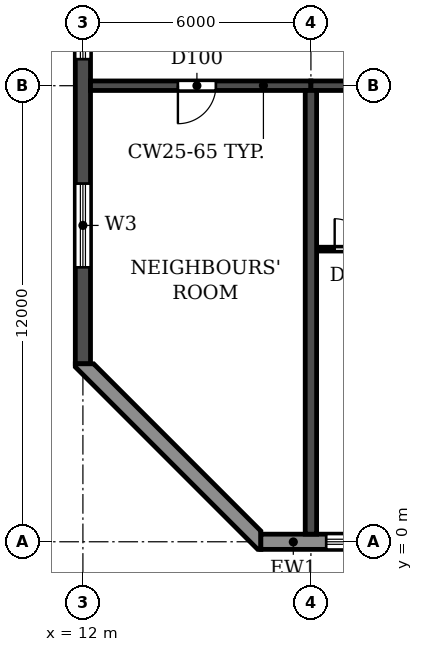
"""IFC4 building model, lengths in metres.
Left out: names, types, materials, properties, quantities, classifications, styles, units other than length and angle.
Written with IfcOpenShell. Run it as: python <this file> out.ifc"""

import sys

from ifc_helpers import new_model, si_unit, direction, frame, frame_2d, origin, place, context, subcontext, project, spatial, polyline, rectangle, outline, extrude, element, fill, save


model = new_model("IFC4")
c1 = context("Model", 3, precision=1e-05, world=origin(), true_north=direction((0.0, 1.0)))
c2 = subcontext(c1, "Body", "Model", "MODEL_VIEW")
j1 = project(units=[si_unit("LENGTHUNIT", "METRE"), si_unit("PLANEANGLEUNIT", "RADIAN")], contexts=[c1])
p1 = place(None, origin())
s1 = spatial("IfcSite", under=j1, at=p1, CompositionType="ELEMENT")
p2 = place(p1, origin())
s2 = spatial("IfcBuilding", under=s1, at=p2, CompositionType="ELEMENT")
p3 = place(p2, frame((0.0, 0.0, 125.7)))
s3 = spatial("IfcBuildingStorey", under=s2, at=p3, CompositionType="ELEMENT", Elevation=125.7)
p4 = place(p3, frame((18.0, 0.2, 0.0), z_axis=(0.0, 0.0, 1.0), x_axis=(0.0, 1.0, 0.0)))
e1 = element("IfcWall", 1, at=p4, inside=s3, PredefinedType="SHEAR", context=c2, shape_type="SweptSolid", body=[
    extrude(rectangle(XDim=11.675, YDim=0.3, at=frame_2d((5.837, 0.0))), origin(), (0.0, 0.0, 1.0), 3.07),
])
p5 = place(p3, frame((12.0, 4.683, 0.0), z_axis=(0.0, 0.0, 1.0), x_axis=(0.0, 1.0, 0.0)))
e2 = element("IfcWall", 2, at=p5, inside=s3, PredefinedType="SHEAR", context=c2, shape_type="SweptSolid", body=[
    extrude(rectangle(XDim=33.034, YDim=0.4, at=frame_2d((16.517, 0.0))), origin(), (0.0, 0.0, 1.0), 3.07),
])
p6 = place(p5, frame((23.817, 0.0, 0.9)))
e3 = element("IfcOpeningElement", 3, at=p6, cuts=e2, PredefinedType="OPENING", context=c2, shape_type="SweptSolid", body=[
    extrude(rectangle(XDim=1.2, YDim=1.5, at=frame_2d((0.6, 0.75))), frame((0.0, 0.21, 0.0), z_axis=(0.0, -1.0, 0.0), x_axis=(1.0, 0.0, 0.0)), (0.0, 0.0, 1.0), 0.42),
])
p7 = place(p5, frame((8.017, 0.0, 0.9)))
e4 = element("IfcOpeningElement", 4, at=p7, cuts=e2, PredefinedType="OPENING", context=c2, shape_type="SweptSolid", body=[
    extrude(rectangle(XDim=1.2, YDim=1.5, at=frame_2d((0.6, 0.75))), frame((0.0, 0.21, 0.0), z_axis=(0.0, -1.0, 0.0), x_axis=(1.0, 0.0, 0.0)), (0.0, 0.0, 1.0), 0.42),
])
p8 = place(p5, frame((28.293, 0.0, 0.6)))
e5 = element("IfcOpeningElement", 5, at=p8, cuts=e2, PredefinedType="OPENING", context=c2, shape_type="SweptSolid", body=[
    extrude(rectangle(XDim=2.2, YDim=1.8, at=frame_2d((1.1, 0.9))), frame((0.0, 0.21, 0.0), z_axis=(0.0, -1.0, 0.0), x_axis=(1.0, 0.0, 0.0)), (0.0, 0.0, 1.0), 0.42),
])
p9 = place(p5, frame((2.541, 0.0, 0.6)))
e6 = element("IfcOpeningElement", 6, at=p9, cuts=e2, PredefinedType="OPENING", context=c2, shape_type="SweptSolid", body=[
    extrude(rectangle(XDim=2.2, YDim=1.8, at=frame_2d((1.1, 0.9))), frame((0.0, 0.21, 0.0), z_axis=(0.0, -1.0, 0.0), x_axis=(1.0, 0.0, 0.0)), (0.0, 0.0, 1.0), 0.42),
])
p10 = place(p5, frame((12.817, 0.0, 0.6)))
e7 = element("IfcOpeningElement", 7, at=p10, cuts=e2, PredefinedType="OPENING", context=c2, shape_type="SweptSolid", body=[
    extrude(rectangle(XDim=2.2, YDim=1.8, at=frame_2d((1.1, 0.9))), frame((0.0, 0.21, 0.0), z_axis=(0.0, -1.0, 0.0), x_axis=(1.0, 0.0, 0.0)), (0.0, 0.0, 1.0), 0.42),
])
p11 = place(p3, frame((12.2, 12.0, 0.0), z_axis=(0.0, 0.0, 1.0), x_axis=(1.0, 0.0, 0.0)))
e8 = element("IfcWall", 8, at=p11, inside=s3, PredefinedType="SHEAR", context=c2, shape_type="SweptSolid", body=[
    extrude(rectangle(XDim=5.8, YDim=0.25, at=frame_2d((2.9, 0.0))), origin(), (0.0, 0.0, 1.0), 2.47),
])
p12 = place(p11, frame((2.3, 0.0, 0.0)))
e9 = element("IfcOpeningElement", 9, at=p12, cuts=e8, PredefinedType="OPENING", context=c2, shape_type="SweptSolid", body=[
    extrude(rectangle(XDim=1.0, YDim=2.1, at=frame_2d((0.5, 1.05))), frame((0.0, 0.135, 0.0), z_axis=(0.0, -1.0, 0.0), x_axis=(1.0, 0.0, 0.0)), (0.0, 0.0, 1.0), 0.27),
])
p13 = place(p3, frame((18.0, 12.0, 0.0), z_axis=(0.0, 0.0, 1.0), x_axis=(1.0, 0.0, 0.0)))
e10 = element("IfcWall", 10, at=p13, inside=s3, PredefinedType="SHEAR", context=c2, shape_type="SweptSolid", body=[
    extrude(rectangle(XDim=6.0, YDim=0.25, at=frame_2d((3.0, 0.0))), origin(), (0.0, 0.0, 1.0), 2.47),
])
p14 = place(p13, frame((2.45, 0.0, 0.0)))
e11 = element("IfcOpeningElement", 11, at=p14, cuts=e10, PredefinedType="OPENING", context=c2, shape_type="SweptSolid", body=[
    extrude(rectangle(XDim=1.0, YDim=2.1, at=frame_2d((0.5, 1.05))), frame((0.0, 0.135, 0.0), z_axis=(0.0, -1.0, 0.0), x_axis=(1.0, 0.0, 0.0)), (0.0, 0.0, 1.0), 0.27),
])
p15 = place(p3, frame((16.683, 0.0, 0.0), z_axis=(0.0, 0.0, 1.0), x_axis=(1.0, 0.0, 0.0)))
e12 = element("IfcWall", 12, at=p15, inside=s3, PredefinedType="STANDARD", context=c2, shape_type="SweptSolid", body=[
    extrude(rectangle(XDim=68.634, YDim=0.4, at=frame_2d((34.317, 0.0))), origin(), (0.0, 0.0, 1.0), 3.07),
])
p16 = place(p15, frame((1.717, 0.0, 0.9)))
e13 = element("IfcOpeningElement", 13, at=p16, cuts=e12, PredefinedType="OPENING", context=c2, shape_type="SweptSolid", body=[
    extrude(rectangle(XDim=2.2, YDim=1.5, at=frame_2d((1.1, 0.75))), frame((0.0, 0.21, 0.0), z_axis=(0.0, -1.0, 0.0), x_axis=(1.0, 0.0, 0.0)), (0.0, 0.0, 1.0), 0.42),
])
p17 = place(p15, frame((4.717, 0.0, 0.9)))
e14 = element("IfcOpeningElement", 14, at=p17, cuts=e12, PredefinedType="OPENING", context=c2, shape_type="SweptSolid", body=[
    extrude(rectangle(XDim=2.2, YDim=1.5, at=frame_2d((1.1, 0.75))), frame((0.0, 0.21, 0.0), z_axis=(0.0, -1.0, 0.0), x_axis=(1.0, 0.0, 0.0)), (0.0, 0.0, 1.0), 0.42),
])
p18 = place(p15, frame((7.717, 0.0, 0.9)))
e15 = element("IfcOpeningElement", 15, at=p18, cuts=e12, PredefinedType="OPENING", context=c2, shape_type="SweptSolid", body=[
    extrude(rectangle(XDim=2.2, YDim=1.5, at=frame_2d((1.1, 0.75))), frame((0.0, 0.21, 0.0), z_axis=(0.0, -1.0, 0.0), x_axis=(1.0, 0.0, 0.0)), (0.0, 0.0, 1.0), 0.42),
])
p19 = place(p15, frame((10.717, 0.0, 0.9)))
e16 = element("IfcOpeningElement", 16, at=p19, cuts=e12, PredefinedType="OPENING", context=c2, shape_type="SweptSolid", body=[
    extrude(rectangle(XDim=2.2, YDim=1.5, at=frame_2d((1.1, 0.75))), frame((0.0, 0.21, 0.0), z_axis=(0.0, -1.0, 0.0), x_axis=(1.0, 0.0, 0.0)), (0.0, 0.0, 1.0), 0.42),
])
p20 = place(p15, frame((13.717, 0.0, 0.9)))
e17 = element("IfcOpeningElement", 17, at=p20, cuts=e12, PredefinedType="OPENING", context=c2, shape_type="SweptSolid", body=[
    extrude(rectangle(XDim=2.2, YDim=1.5, at=frame_2d((1.1, 0.75))), frame((0.0, 0.21, 0.0), z_axis=(0.0, -1.0, 0.0), x_axis=(1.0, 0.0, 0.0)), (0.0, 0.0, 1.0), 0.42),
])
p21 = place(p15, frame((16.717, 0.0, 0.9)))
e18 = element("IfcOpeningElement", 18, at=p21, cuts=e12, PredefinedType="OPENING", context=c2, shape_type="SweptSolid", body=[
    extrude(rectangle(XDim=2.2, YDim=1.5, at=frame_2d((1.1, 0.75))), frame((0.0, 0.21, 0.0), z_axis=(0.0, -1.0, 0.0), x_axis=(1.0, 0.0, 0.0)), (0.0, 0.0, 1.0), 0.42),
])
p22 = place(p15, frame((19.717, 0.0, 0.9)))
e19 = element("IfcOpeningElement", 19, at=p22, cuts=e12, PredefinedType="OPENING", context=c2, shape_type="SweptSolid", body=[
    extrude(rectangle(XDim=2.2, YDim=1.5, at=frame_2d((1.1, 0.75))), frame((0.0, 0.21, 0.0), z_axis=(0.0, -1.0, 0.0), x_axis=(1.0, 0.0, 0.0)), (0.0, 0.0, 1.0), 0.42),
])
p23 = place(p15, frame((22.917, 0.0, 0.0)))
e20 = element("IfcOpeningElement", 20, at=p23, cuts=e12, PredefinedType="OPENING", context=c2, shape_type="SweptSolid", body=[
    extrude(rectangle(XDim=1.8, YDim=2.4, at=frame_2d((0.9, 1.2))), frame((0.0, 0.21, 0.0), z_axis=(0.0, -1.0, 0.0), x_axis=(1.0, 0.0, 0.0)), (0.0, 0.0, 1.0), 0.42),
])
p24 = place(p15, frame((25.717, 0.0, 0.9)))
e21 = element("IfcOpeningElement", 21, at=p24, cuts=e12, PredefinedType="OPENING", context=c2, shape_type="SweptSolid", body=[
    extrude(rectangle(XDim=2.2, YDim=1.5, at=frame_2d((1.1, 0.75))), frame((0.0, 0.21, 0.0), z_axis=(0.0, -1.0, 0.0), x_axis=(1.0, 0.0, 0.0)), (0.0, 0.0, 1.0), 0.42),
])
p25 = place(p15, frame((28.717, 0.0, 0.9)))
e22 = element("IfcOpeningElement", 22, at=p25, cuts=e12, PredefinedType="OPENING", context=c2, shape_type="SweptSolid", body=[
    extrude(rectangle(XDim=2.2, YDim=1.5, at=frame_2d((1.1, 0.75))), frame((0.0, 0.21, 0.0), z_axis=(0.0, -1.0, 0.0), x_axis=(1.0, 0.0, 0.0)), (0.0, 0.0, 1.0), 0.42),
])
p26 = place(p15, frame((31.717, 0.0, 0.9)))
e23 = element("IfcOpeningElement", 23, at=p26, cuts=e12, PredefinedType="OPENING", context=c2, shape_type="SweptSolid", body=[
    extrude(rectangle(XDim=2.2, YDim=1.5, at=frame_2d((1.1, 0.75))), frame((0.0, 0.21, 0.0), z_axis=(0.0, -1.0, 0.0), x_axis=(1.0, 0.0, 0.0)), (0.0, 0.0, 1.0), 0.42),
])
p27 = place(p15, frame((34.917, 0.0, 0.0)))
e24 = element("IfcOpeningElement", 24, at=p27, cuts=e12, PredefinedType="OPENING", context=c2, shape_type="SweptSolid", body=[
    extrude(rectangle(XDim=1.8, YDim=2.4, at=frame_2d((0.9, 1.2))), frame((0.0, 0.21, 0.0), z_axis=(0.0, -1.0, 0.0), x_axis=(1.0, 0.0, 0.0)), (0.0, 0.0, 1.0), 0.42),
])
p28 = place(p15, frame((37.717, 0.0, 0.9)))
e25 = element("IfcOpeningElement", 25, at=p28, cuts=e12, PredefinedType="OPENING", context=c2, shape_type="SweptSolid", body=[
    extrude(rectangle(XDim=2.2, YDim=1.5, at=frame_2d((1.1, 0.75))), frame((0.0, 0.21, 0.0), z_axis=(0.0, -1.0, 0.0), x_axis=(1.0, 0.0, 0.0)), (0.0, 0.0, 1.0), 0.42),
])
p29 = place(p15, frame((40.717, 0.0, 0.9)))
e26 = element("IfcOpeningElement", 26, at=p29, cuts=e12, PredefinedType="OPENING", context=c2, shape_type="SweptSolid", body=[
    extrude(rectangle(XDim=2.2, YDim=1.5, at=frame_2d((1.1, 0.75))), frame((0.0, 0.21, 0.0), z_axis=(0.0, -1.0, 0.0), x_axis=(1.0, 0.0, 0.0)), (0.0, 0.0, 1.0), 0.42),
])
p30 = place(p15, frame((43.717, 0.0, 0.9)))
e27 = element("IfcOpeningElement", 27, at=p30, cuts=e12, PredefinedType="OPENING", context=c2, shape_type="SweptSolid", body=[
    extrude(rectangle(XDim=2.2, YDim=1.5, at=frame_2d((1.1, 0.75))), frame((0.0, 0.21, 0.0), z_axis=(0.0, -1.0, 0.0), x_axis=(1.0, 0.0, 0.0)), (0.0, 0.0, 1.0), 0.42),
])
p31 = place(p15, frame((46.917, 0.0, 0.0)))
e28 = element("IfcOpeningElement", 28, at=p31, cuts=e12, PredefinedType="OPENING", context=c2, shape_type="SweptSolid", body=[
    extrude(rectangle(XDim=1.8, YDim=2.4, at=frame_2d((0.9, 1.2))), frame((0.0, 0.21, 0.0), z_axis=(0.0, -1.0, 0.0), x_axis=(1.0, 0.0, 0.0)), (0.0, 0.0, 1.0), 0.42),
])
p32 = place(p15, frame((49.717, 0.0, 0.9)))
e29 = element("IfcOpeningElement", 29, at=p32, cuts=e12, PredefinedType="OPENING", context=c2, shape_type="SweptSolid", body=[
    extrude(rectangle(XDim=2.2, YDim=1.5, at=frame_2d((1.1, 0.75))), frame((0.0, 0.21, 0.0), z_axis=(0.0, -1.0, 0.0), x_axis=(1.0, 0.0, 0.0)), (0.0, 0.0, 1.0), 0.42),
])
p33 = place(p15, frame((52.717, 0.0, 0.9)))
e30 = element("IfcOpeningElement", 30, at=p33, cuts=e12, PredefinedType="OPENING", context=c2, shape_type="SweptSolid", body=[
    extrude(rectangle(XDim=2.2, YDim=1.5, at=frame_2d((1.1, 0.75))), frame((0.0, 0.21, 0.0), z_axis=(0.0, -1.0, 0.0), x_axis=(1.0, 0.0, 0.0)), (0.0, 0.0, 1.0), 0.42),
])
p34 = place(p15, frame((55.717, 0.0, 0.9)))
e31 = element("IfcOpeningElement", 31, at=p34, cuts=e12, PredefinedType="OPENING", context=c2, shape_type="SweptSolid", body=[
    extrude(rectangle(XDim=2.2, YDim=1.5, at=frame_2d((1.1, 0.75))), frame((0.0, 0.21, 0.0), z_axis=(0.0, -1.0, 0.0), x_axis=(1.0, 0.0, 0.0)), (0.0, 0.0, 1.0), 0.42),
])
p35 = place(p15, frame((58.917, 0.0, 0.0)))
e32 = element("IfcOpeningElement", 32, at=p35, cuts=e12, PredefinedType="OPENING", context=c2, shape_type="SweptSolid", body=[
    extrude(rectangle(XDim=1.8, YDim=2.4, at=frame_2d((0.9, 1.2))), frame((0.0, 0.21, 0.0), z_axis=(0.0, -1.0, 0.0), x_axis=(1.0, 0.0, 0.0)), (0.0, 0.0, 1.0), 0.42),
])
p36 = place(p15, frame((61.717, 0.0, 0.9)))
e33 = element("IfcOpeningElement", 33, at=p36, cuts=e12, PredefinedType="OPENING", context=c2, shape_type="SweptSolid", body=[
    extrude(rectangle(XDim=2.2, YDim=1.5, at=frame_2d((1.1, 0.75))), frame((0.0, 0.21, 0.0), z_axis=(0.0, -1.0, 0.0), x_axis=(1.0, 0.0, 0.0)), (0.0, 0.0, 1.0), 0.42),
])
p37 = place(p15, frame((64.717, 0.0, 0.9)))
e34 = element("IfcOpeningElement", 34, at=p37, cuts=e12, PredefinedType="OPENING", context=c2, shape_type="SweptSolid", body=[
    extrude(rectangle(XDim=2.2, YDim=1.5, at=frame_2d((1.1, 0.75))), frame((0.0, 0.21, 0.0), z_axis=(0.0, -1.0, 0.0), x_axis=(1.0, 0.0, 0.0)), (0.0, 0.0, 1.0), 0.42),
])
p38 = place(p3, origin())
e35 = element("IfcWall", 35, at=p38, inside=s3, PredefinedType="STANDARD", context=c2, shape_type="SweptSolid", body=[
    extrude(outline(polyline([(11.8, 4.683), (11.8, 4.6), (16.6, -0.2), (16.683, -0.2), (16.683, 0.283), (12.283, 4.683), (11.8, 4.683)])), origin(), (0.0, 0.0, 1.0), 3.07),
])
p39 = place(p3, frame((18.16, 7.7, 0.0), z_axis=(0.0, 0.0, 1.0), x_axis=(1.0, 0.0, 0.0)))
e36 = element("IfcWall", 36, at=p39, inside=s3, PredefinedType="PARTITIONING", context=c2, shape_type="SweptSolid", body=[
    extrude(rectangle(XDim=1.94, YDim=0.1, at=frame_2d((0.97, 0.0))), origin(), (0.0, 0.0, 1.0), 3.07),
])
p40 = place(p39, frame((0.465, 0.0, 0.0)))
e37 = element("IfcOpeningElement", 37, at=p40, cuts=e36, PredefinedType="OPENING", context=c2, shape_type="SweptSolid", body=[
    extrude(rectangle(XDim=0.8, YDim=2.1, at=frame_2d((0.4, 1.05))), frame((0.0, 0.06, 0.0), z_axis=(0.0, -1.0, 0.0), x_axis=(1.0, 0.0, 0.0)), (0.0, 0.0, 1.0), 0.12),
])
p41 = place(p16, origin())
e38 = element("IfcWindow", 38, at=p41, inside=s3, PartitioningType="DOUBLE_PANEL_HORIZONTAL", PredefinedType="WINDOW", context=c2, shape_type="SweptSolid", body=[
    extrude(rectangle(XDim=2.2, YDim=1.5, at=frame_2d((1.1, 0.75))), frame((0.0, 0.03, 0.0), z_axis=(0.0, -1.0, 0.0), x_axis=(1.0, 0.0, 0.0)), (0.0, 0.0, 1.0), 0.06),
])
fill(e13, e38)
p42 = place(p7, origin())
e39 = element("IfcWindow", 39, at=p42, inside=s3, PartitioningType="SINGLE_PANEL", PredefinedType="WINDOW", context=c2, shape_type="SweptSolid", body=[
    extrude(rectangle(XDim=1.2, YDim=1.5, at=frame_2d((0.6, 0.75))), frame((0.0, 0.03, 0.0), z_axis=(0.0, -1.0, 0.0), x_axis=(1.0, 0.0, 0.0)), (0.0, 0.0, 1.0), 0.06),
])
fill(e4, e39)
p43 = place(p9, origin())
e40 = element("IfcWindow", 40, at=p43, inside=s3, PartitioningType="DOUBLE_PANEL_HORIZONTAL", PredefinedType="WINDOW", context=c2, shape_type="SweptSolid", body=[
    extrude(rectangle(XDim=2.2, YDim=1.8, at=frame_2d((1.1, 0.9))), frame((0.0, 0.03, 0.0), z_axis=(0.0, -1.0, 0.0), x_axis=(1.0, 0.0, 0.0)), (0.0, 0.0, 1.0), 0.06),
])
fill(e6, e40)
p44 = place(p12, frame((1.0, 0.0, 0.0), z_axis=(0.0, 0.0, 1.0), x_axis=(-1.0, 0.0, 0.0)))
e41 = element("IfcDoor", 41, at=p44, inside=s3, OperationType="SINGLE_SWING_RIGHT", PredefinedType="DOOR", context=c2, shape_type="SweptSolid", body=[
    extrude(rectangle(XDim=1.0, YDim=2.1, at=frame_2d((0.5, 1.05))), frame((0.0, 0.025, 0.0), z_axis=(0.0, -1.0, 0.0), x_axis=(1.0, 0.0, 0.0)), (0.0, 0.0, 1.0), 0.05),
])
fill(e9, e41)
p45 = place(p40, origin())
e42 = element("IfcDoor", 42, at=p45, inside=s3, OperationType="SINGLE_SWING_LEFT", PredefinedType="DOOR", context=c2, shape_type="SweptSolid", body=[
    extrude(rectangle(XDim=0.8, YDim=2.1, at=frame_2d((0.4, 1.05))), frame((0.0, 0.025, 0.0), z_axis=(0.0, -1.0, 0.0), x_axis=(1.0, 0.0, 0.0)), (0.0, 0.0, 1.0), 0.05),
])
fill(e37, e42)
save(model, sys.argv[1])
